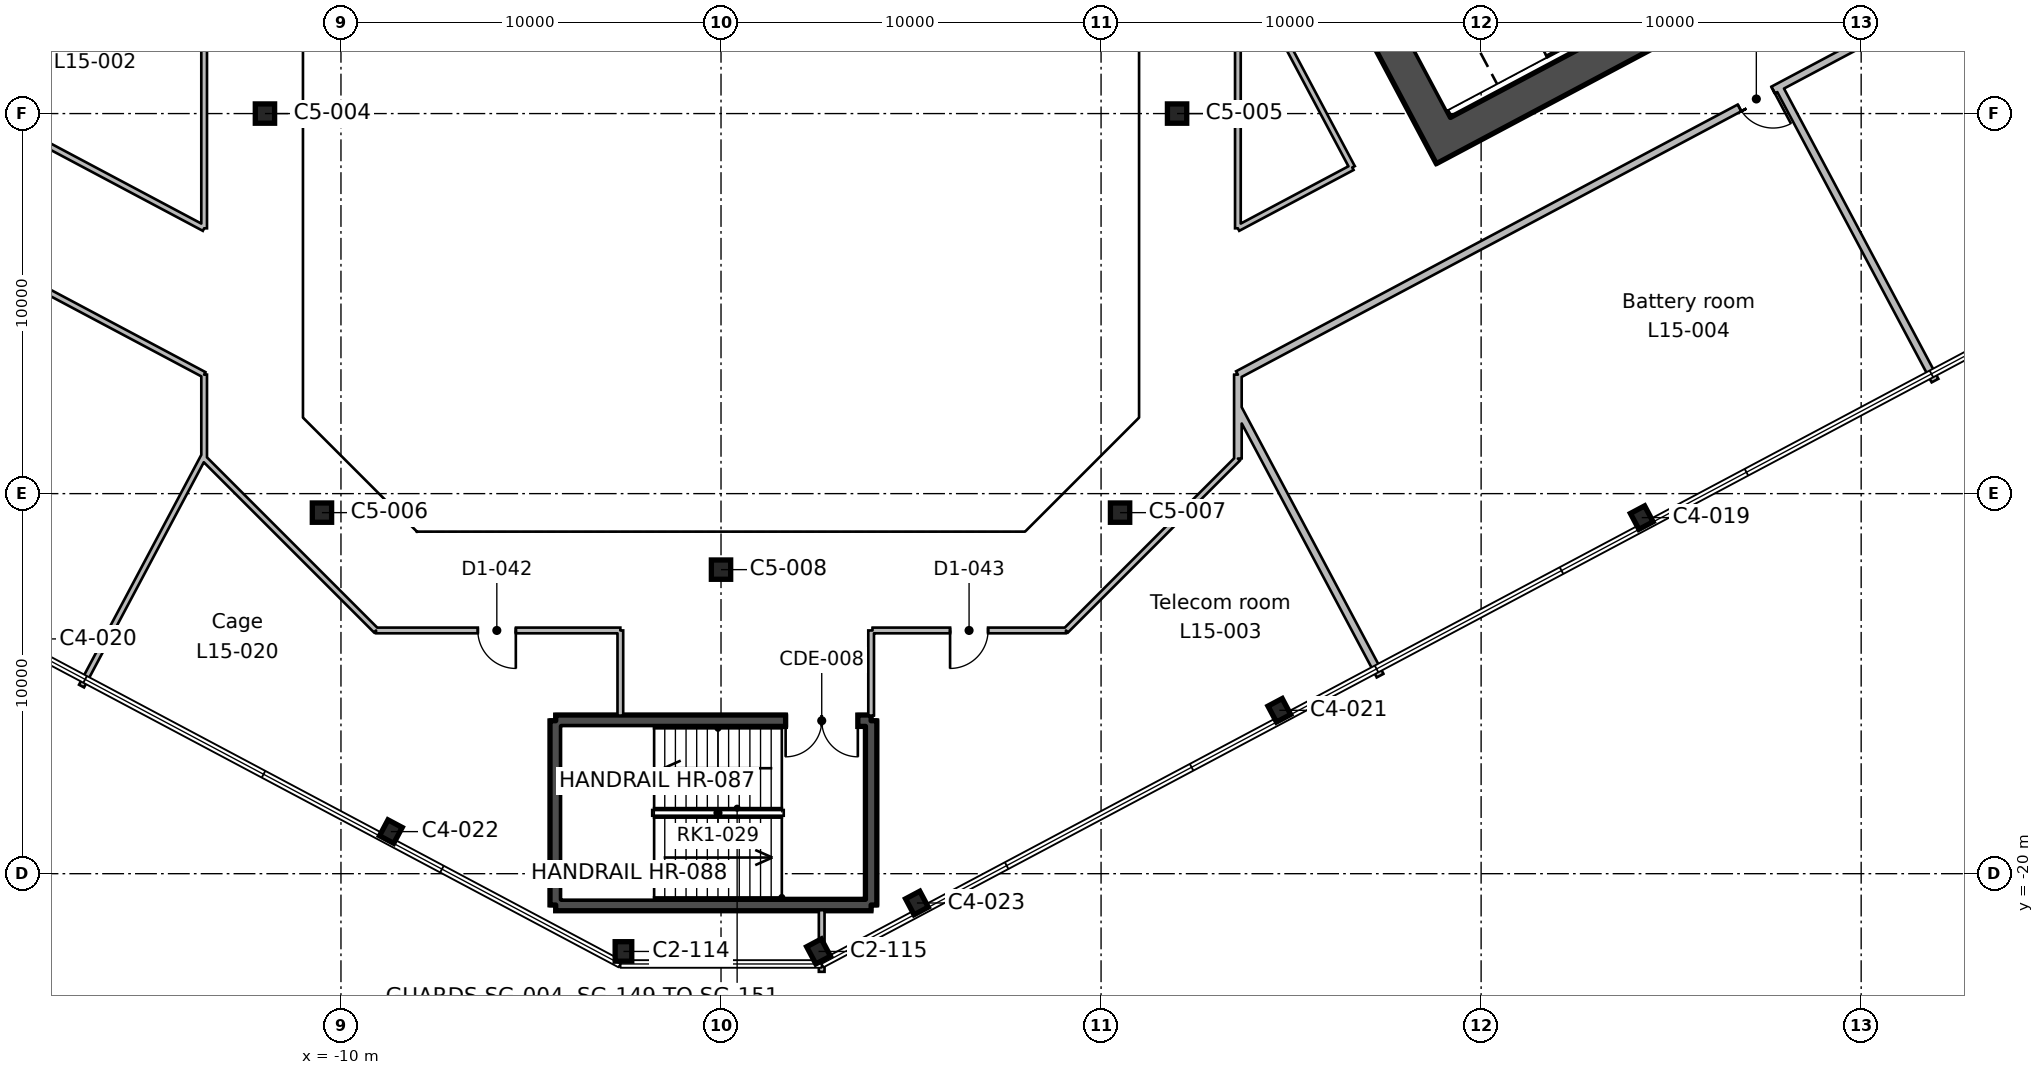
"""IFC4 building model, lengths in metres.
Left out: names, types, materials, properties, quantities, classifications, styles, units other than length and angle.
Written with IfcOpenShell. Run it as: python <this file> out.ifc"""

import sys

from ifc_helpers import new_model, si_unit, direction, frame, frame_2d, origin, origin_2d, place, context, subcontext, project, spatial, rectangle, hollow_rectangle, i_section, extrude, element, fill, save


model = new_model("IFC4")
c1 = context("Model", 3, precision=1e-05, world=origin(), true_north=direction((0.0, 1.0)))
c2 = subcontext(c1, "Body", "Model", "MODEL_VIEW")
j1 = project(units=[si_unit("LENGTHUNIT", "METRE"), si_unit("PLANEANGLEUNIT", "RADIAN")], contexts=[c1])
p1 = place(None, origin())
s1 = spatial("IfcSite", under=j1, at=p1, CompositionType="ELEMENT")
p2 = place(p1, origin())
s2 = spatial("IfcBuilding", under=s1, at=p2, CompositionType="ELEMENT")
p3 = place(p2, frame((0.0, 0.0, 80.0)))
s3 = spatial("IfcBuildingStorey", under=s2, at=p3, CompositionType="ELEMENT", Elevation=80.0)
for number, where, z_axis, x_axis in (
    (1, (-2.567, -22.046, 0.0), (0.0, 0.0, 1.0), (1.0, 0.0, 0.0)),
    (2, (2.567, -22.046, 0.0), (0.0, 0.0, 1.0), (0.883, 0.469, 0.0)),
):
    element("IfcColumn", number, at=place(p3, frame(where, z_axis=z_axis, x_axis=x_axis)), inside=s3, PredefinedType="COLUMN", context=c2, shape_type="SweptSolid", body=[
        extrude(i_section(OverallWidth=0.437, OverallDepth=0.513, WebThickness=0.061, FlangeThickness=0.097, FilletRadius=0.015, at=origin_2d()), origin(), (0.0, 0.0, 1.0), 4.6),
    ])
for number, where, z_axis, x_axis in (
    (3, (5.155, -20.771, 0.0), (0.0, 0.0, 1.0), (0.883, 0.469, 0.0)),
    (4, (-8.687, -18.893, 0.0), (0.0, 0.0, 1.0), (0.883, -0.469, 0.0)),
    (5, (14.691, -15.701, 0.0), (0.0, 0.0, 1.0), (0.883, 0.469, 0.0)),
):
    element("IfcColumn", number, at=place(p3, frame(where, z_axis=z_axis, x_axis=x_axis)), inside=s3, PredefinedType="COLUMN", context=c2, shape_type="SweptSolid", body=[
        extrude(i_section(OverallWidth=0.424, OverallDepth=0.475, WebThickness=0.048, FlangeThickness=0.077, FilletRadius=0.015, at=origin_2d()), origin(), (0.0, 0.0, 1.0), 4.6),
    ])
p4 = place(p3, frame((0.0, -12.0, 0.0), z_axis=(0.0, 0.0, 1.0), x_axis=(1.0, 0.0, 0.0)))
e6 = element("IfcColumn", 6, at=p4, inside=s3, PredefinedType="COLUMN", context=c2, shape_type="SweptSolid", body=[
    extrude(hollow_rectangle(XDim=0.508, YDim=0.508, WallThickness=0.021, InnerFilletRadius=0.01, OuterFilletRadius=0.031, at=origin_2d()), origin(), (0.0, 0.0, 1.0), 4.6),
])
p5 = place(p3, frame((24.227, -10.631, 0.0), z_axis=(0.0, 0.0, 1.0), x_axis=(0.882947592859, 0.469471562786, 0.0)))
e7 = element("IfcColumn", 7, at=p5, inside=s3, PredefinedType="COLUMN", context=c2, shape_type="SweptSolid", body=[
    extrude(i_section(OverallWidth=0.424, OverallDepth=0.475, WebThickness=0.048, FlangeThickness=0.077, FilletRadius=0.015, at=origin_2d()), origin(), (0.0, 0.0, 1.0), 4.6),
])
for number, where, z_axis, x_axis in (
    (8, (-10.5, -10.5, 0.0), (0.0, 0.0, 1.0), (1.0, 0.0, 0.0)),
    (9, (10.5, -10.5, 0.0), (0.0, 0.0, 1.0), (1.0, 0.0, 0.0)),
    (10, (-12.0, 0.0, 0.0), (0.0, 0.0, 1.0), (1.0, 0.0, 0.0)),
    (11, (12.0, 0.0, 0.0), (0.0, 0.0, 1.0), (1.0, 0.0, 0.0)),
):
    element("IfcColumn", number, at=place(p3, frame(where, z_axis=z_axis, x_axis=x_axis)), inside=s3, PredefinedType="COLUMN", context=c2, shape_type="SweptSolid", body=[
        extrude(hollow_rectangle(XDim=0.508, YDim=0.508, WallThickness=0.021, InnerFilletRadius=0.01, OuterFilletRadius=0.031, at=origin_2d()), origin(), (0.0, 0.0, 1.0), 4.6),
    ])
p6 = place(p3, frame((-13.362, 18.43, 0.0), z_axis=(0.0, 0.0, 1.0), x_axis=(-0.46947084998, -0.882947971864, 0.0)))
e12 = element("IfcWall", 12, at=p6, inside=s3, PredefinedType="SHEAR", context=c2, shape_type="SweptSolid", body=[
    extrude(rectangle(XDim=20.0, YDim=0.9, at=frame_2d((10.0, 0.0))), origin(), (0.0, 0.0, 1.0), 4.6),
])
p7 = place(p6, frame((7.0, 0.0, 0.0)))
e13 = element("IfcOpeningElement", 13, at=p7, cuts=e12, PredefinedType="OPENING", context=c2, shape_type="SweptSolid", body=[
    extrude(rectangle(XDim=2.4, YDim=2.4, at=frame_2d((1.2, 1.2))), frame((0.0, 0.46, 0.0), z_axis=(0.0, -1.0, 0.0), x_axis=(1.0, 0.0, 0.0)), (0.0, 0.0, 1.0), 0.92),
])
p8 = place(p3, frame((19.219, -1.107, 0.0), z_axis=(0.0, 0.0, 1.0), x_axis=(-0.46947084998, 0.882947971864, 0.0)))
e14 = element("IfcWall", 14, at=p8, inside=s3, PredefinedType="SHEAR", context=c2, shape_type="SweptSolid", body=[
    extrude(rectangle(XDim=20.0, YDim=0.9, at=frame_2d((10.0, 0.0))), origin(), (0.0, 0.0, 1.0), 4.6),
])
p9 = place(p8, frame((7.0, 0.0, 0.0)))
e15 = element("IfcOpeningElement", 15, at=p9, cuts=e14, PredefinedType="OPENING", context=c2, shape_type="SweptSolid", body=[
    extrude(rectangle(XDim=2.4, YDim=2.4, at=frame_2d((1.2, 1.2))), frame((0.0, 0.46, 0.0), z_axis=(0.0, -1.0, 0.0), x_axis=(1.0, 0.0, 0.0)), (0.0, 0.0, 1.0), 0.92),
])
p10 = place(p3, frame((19.405, -0.498, 0.0), z_axis=(0.0, 0.0, 1.0), x_axis=(0.88294509198, 0.469476266226, 0.0)))
e16 = element("IfcWall", 16, at=p10, inside=s3, PredefinedType="SHEAR", context=c2, shape_type="SweptSolid", body=[
    extrude(rectangle(XDim=20.2, YDim=0.9, at=frame_2d((10.1, 0.0))), origin(), (0.0, 0.0, 1.0), 4.6),
])
p11 = place(p3, frame((3.95, -15.975, 0.0), z_axis=(0.0, 0.0, 1.0), x_axis=(0.0, -1.0, 0.0)))
e17 = element("IfcWall", 17, at=p11, inside=s3, PredefinedType="SHEAR", context=c2, shape_type="SweptSolid", body=[
    extrude(rectangle(XDim=4.85, YDim=0.3, at=frame_2d((2.425, 0.0))), origin(), (0.0, 0.0, 1.0), 4.6),
])
p12 = place(p3, frame((3.95, -20.825, 0.0), z_axis=(0.0, 0.0, 1.0), x_axis=(-1.0, 0.0, 0.0)))
e18 = element("IfcWall", 18, at=p12, inside=s3, PredefinedType="SHEAR", context=c2, shape_type="SweptSolid", body=[
    extrude(rectangle(XDim=8.3, YDim=0.3, at=frame_2d((4.15, 0.0))), origin(), (0.0, 0.0, 1.0), 4.6),
])
p13 = place(p3, frame((-4.35, -20.825, 0.0), z_axis=(0.0, 0.0, 1.0), x_axis=(0.0, 1.0, 0.0)))
e19 = element("IfcWall", 19, at=p13, inside=s3, PredefinedType="SHEAR", context=c2, shape_type="SweptSolid", body=[
    extrude(rectangle(XDim=4.85, YDim=0.3, at=frame_2d((2.425, 0.0))), origin(), (0.0, 0.0, 1.0), 4.6),
])
p14 = place(p3, frame((-4.35, -15.975, 0.0), z_axis=(0.0, 0.0, 1.0), x_axis=(1.0, 0.0, 0.0)))
e20 = element("IfcWall", 20, at=p14, inside=s3, PredefinedType="SHEAR", context=c2, shape_type="SweptSolid", body=[
    extrude(rectangle(XDim=8.3, YDim=0.3, at=frame_2d((4.15, 0.0))), origin(), (0.0, 0.0, 1.0), 4.6),
])
p15 = place(p14, frame((6.05, 0.0, 0.0)))
e21 = element("IfcOpeningElement", 21, at=p15, cuts=e20, PredefinedType="OPENING", context=c2, shape_type="SweptSolid", body=[
    extrude(rectangle(XDim=1.9, YDim=2.1, at=frame_2d((0.95, 1.05))), frame((0.0, 0.16, 0.0), z_axis=(0.0, -1.0, 0.0), x_axis=(1.0, 0.0, 0.0)), (0.0, 0.0, 1.0), 0.32),
])
p16 = place(p3, frame((-2.649, -15.84, 0.0), z_axis=(0.0, 0.0, 1.0), x_axis=(0.0, 1.0, 0.0)))
e22 = element("IfcWall", 22, at=p16, inside=s3, PredefinedType="PARTITIONING", context=c2, shape_type="SweptSolid", body=[
    extrude(rectangle(XDim=2.24, YDim=0.15, at=frame_2d((1.12, 0.0))), origin(), (0.0, 0.0, 1.0), 4.2),
])
p17 = place(p3, frame((-2.649, -13.6, 0.0), z_axis=(0.0, 0.0, 1.0), x_axis=(-1.0, 0.0, 0.0)))
e23 = element("IfcWall", 23, at=p17, inside=s3, PredefinedType="PARTITIONING", context=c2, shape_type="SweptSolid", body=[
    extrude(rectangle(XDim=6.428, YDim=0.15, at=frame_2d((3.214, 0.0))), origin(), (0.0, 0.0, 1.0), 4.2),
])
p18 = place(p17, frame((2.75, 0.0, 0.0)))
e24 = element("IfcOpeningElement", 24, at=p18, cuts=e23, PredefinedType="OPENING", context=c2, shape_type="SweptSolid", body=[
    extrude(rectangle(XDim=1.0, YDim=2.1, at=frame_2d((0.5, 1.05))), frame((0.0, 0.085, 0.0), z_axis=(0.0, -1.0, 0.0), x_axis=(1.0, 0.0, 0.0)), (0.0, 0.0, 1.0), 0.17),
])
p19 = place(p3, frame((-9.077, -13.6, 0.0), z_axis=(0.0, 0.0, 1.0), x_axis=(-0.707106781187, 0.707106781187, 0.0)))
e25 = element("IfcWall", 25, at=p19, inside=s3, PredefinedType="PARTITIONING", context=c2, shape_type="SweptSolid", body=[
    extrude(rectangle(XDim=6.397, YDim=0.15, at=frame_2d((3.198, 0.0))), origin(), (0.0, 0.0, 1.0), 4.2),
])
p20 = place(p3, frame((-13.6, -9.077, 0.0), z_axis=(0.0, 0.0, 1.0), x_axis=(0.0, 1.0, 0.0)))
e26 = element("IfcWall", 26, at=p20, inside=s3, PredefinedType="PARTITIONING", context=c2, shape_type="SweptSolid", body=[
    extrude(rectangle(XDim=2.208, YDim=0.15, at=frame_2d((1.104, 0.0))), origin(), (0.0, 0.0, 1.0), 4.2),
])
p21 = place(p3, frame((-13.6, -6.869, 0.0), z_axis=(0.0, 0.0, 1.0), x_axis=(-0.88295406426, 0.469459391648, 0.0)))
e27 = element("IfcWall", 27, at=p21, inside=s3, PredefinedType="PARTITIONING", context=c2, shape_type="SweptSolid", body=[
    extrude(rectangle(XDim=35.091, YDim=0.15, at=frame_2d((17.545, 0.0))), origin(), (0.0, 0.0, 1.0), 4.2),
])
p22 = place(p21, frame((20.45, 0.0, 0.0)))
e28 = element("IfcOpeningElement", 28, at=p22, cuts=e27, PredefinedType="OPENING", context=c2, shape_type="SweptSolid", body=[
    extrude(rectangle(XDim=1.0, YDim=2.1, at=frame_2d((0.5, 1.05))), frame((0.0, 0.085, 0.0), z_axis=(0.0, -1.0, 0.0), x_axis=(1.0, 0.0, 0.0)), (0.0, 0.0, 1.0), 0.17),
])
p23 = place(p21, frame((17.05, 0.0, 0.0)))
e29 = element("IfcOpeningElement", 29, at=p23, cuts=e27, PredefinedType="OPENING", context=c2, shape_type="SweptSolid", body=[
    extrude(rectangle(XDim=1.0, YDim=2.1, at=frame_2d((0.5, 1.05))), frame((0.0, 0.085, 0.0), z_axis=(0.0, -1.0, 0.0), x_axis=(1.0, 0.0, 0.0)), (0.0, 0.0, 1.0), 0.17),
])
p24 = place(p3, frame((-13.6, -8.998, 0.0), z_axis=(0.0, 0.0, 1.0), x_axis=(-0.469531053644, -0.882915958438, 0.0)))
e30 = element("IfcWall", 30, at=p24, inside=s3, PredefinedType="PARTITIONING", context=c2, shape_type="SweptSolid", body=[
    extrude(rectangle(XDim=6.87, YDim=0.15, at=frame_2d((3.435, 0.0))), origin(), (0.0, 0.0, 1.0), 4.2),
])
p25 = place(p3, frame((-20.142, 0.46, 0.0), z_axis=(0.0, 0.0, 1.0), x_axis=(0.469506937019, 0.882928783136, 0.0)))
e31 = element("IfcWall", 31, at=p25, inside=s3, PredefinedType="PARTITIONING", context=c2, shape_type="SweptSolid", body=[
    extrude(rectangle(XDim=18.1, YDim=0.15, at=frame_2d((9.05, 0.0))), origin(), (0.0, 0.0, 1.0), 4.2),
])
p26 = place(p25, frame((8.55, 0.0, 0.0)))
e32 = element("IfcOpeningElement", 32, at=p26, cuts=e31, PredefinedType="OPENING", context=c2, shape_type="SweptSolid", body=[
    extrude(rectangle(XDim=1.0, YDim=2.1, at=frame_2d((0.5, 1.05))), frame((0.0, 0.085, 0.0), z_axis=(0.0, -1.0, 0.0), x_axis=(1.0, 0.0, 0.0)), (0.0, 0.0, 1.0), 0.17),
])
p27 = place(p3, frame((-13.6, -3.019, 0.0), z_axis=(0.0, 0.0, 1.0), x_axis=(-0.882915984826, 0.469531004022, 0.0)))
e33 = element("IfcWall", 33, at=p27, inside=s3, PredefinedType="PARTITIONING", context=c2, shape_type="SweptSolid", body=[
    extrude(rectangle(XDim=7.409, YDim=0.15, at=frame_2d((3.705, 0.0))), origin(), (0.0, 0.0, 1.0), 4.2),
])
p28 = place(p3, frame((-13.6, 9.077, 0.0), z_axis=(0.0, 0.0, 1.0), x_axis=(0.0, -1.0, 0.0)))
e34 = element("IfcWall", 34, at=p28, inside=s3, PredefinedType="PARTITIONING", context=c2, shape_type="SweptSolid", body=[
    extrude(rectangle(XDim=12.096, YDim=0.15, at=frame_2d((6.048, 0.0))), origin(), (0.0, 0.0, 1.0), 4.2),
])
p29 = place(p3, frame((2.649, -22.582, 0.0), z_axis=(0.0, 0.0, 1.0), x_axis=(0.0, 1.0, 0.0)))
e35 = element("IfcWall", 35, at=p29, inside=s3, PredefinedType="PARTITIONING", context=c2, shape_type="SweptSolid", body=[
    extrude(rectangle(XDim=1.622, YDim=0.15, at=frame_2d((0.811, 0.0))), origin(), (0.0, 0.0, 1.0), 4.2),
])
p30 = place(p3, frame((3.95, -13.6, 0.0), z_axis=(0.0, 0.0, 1.0), x_axis=(0.0, -1.0, 0.0)))
e36 = element("IfcWall", 36, at=p30, inside=s3, PredefinedType="PARTITIONING", context=c2, shape_type="SweptSolid", body=[
    extrude(rectangle(XDim=2.24, YDim=0.15, at=frame_2d((1.12, 0.0))), origin(), (0.0, 0.0, 1.0), 4.2),
])
p31 = place(p3, frame((13.6, -7.756, 0.0), z_axis=(0.0, 0.0, 1.0), x_axis=(0.0, -1.0, 0.0)))
e37 = element("IfcWall", 37, at=p31, inside=s3, PredefinedType="PARTITIONING", context=c2, shape_type="SweptSolid", body=[
    extrude(rectangle(XDim=1.321, YDim=0.2, at=frame_2d((0.66, 0.0))), origin(), (0.0, 0.0, 1.0), 4.2),
])
p32 = place(p3, frame((13.6, -9.077, 0.0), z_axis=(0.0, 0.0, 1.0), x_axis=(-0.707106781187, -0.707106781187, 0.0)))
e38 = element("IfcWall", 38, at=p32, inside=s3, PredefinedType="PARTITIONING", context=c2, shape_type="SweptSolid", body=[
    extrude(rectangle(XDim=6.397, YDim=0.15, at=frame_2d((3.198, 0.0))), origin(), (0.0, 0.0, 1.0), 4.2),
])
p33 = place(p3, frame((9.077, -13.6, 0.0), z_axis=(0.0, 0.0, 1.0), x_axis=(-1.0, 0.0, 0.0)))
e39 = element("IfcWall", 39, at=p33, inside=s3, PredefinedType="PARTITIONING", context=c2, shape_type="SweptSolid", body=[
    extrude(rectangle(XDim=5.092, YDim=0.15, at=frame_2d((2.546, 0.0))), origin(), (0.0, 0.0, 1.0), 4.2),
])
p34 = place(p33, frame((2.05, 0.0, 0.0)))
e40 = element("IfcOpeningElement", 40, at=p34, cuts=e39, PredefinedType="OPENING", context=c2, shape_type="SweptSolid", body=[
    extrude(rectangle(XDim=1.0, YDim=2.1, at=frame_2d((0.5, 1.05))), frame((0.0, 0.085, 0.0), z_axis=(0.0, -1.0, 0.0), x_axis=(1.0, 0.0, 0.0)), (0.0, 0.0, 1.0), 0.17),
])
p35 = place(p3, frame((13.6, -7.75, 0.0), z_axis=(0.0, 0.0, 1.0), x_axis=(0.469489555723, -0.882938025609, 0.0)))
e41 = element("IfcWall", 41, at=p35, inside=s3, PredefinedType="PARTITIONING", context=c2, shape_type="SweptSolid", body=[
    extrude(rectangle(XDim=7.972, YDim=0.2, at=frame_2d((3.986, 0.0))), origin(), (0.0, 0.0, 1.0), 4.2),
])
p36 = place(p3, frame((13.6, -6.869, 0.0), z_axis=(0.0, 0.0, 1.0), x_axis=(0.0, -1.0, 0.0)))
e42 = element("IfcWall", 42, at=p36, inside=s3, PredefinedType="PARTITIONING", context=c2, shape_type="SweptSolid", body=[
    extrude(rectangle(XDim=0.887, YDim=0.2, at=frame_2d((0.444, 0.0))), origin(), (0.0, 0.0, 1.0), 4.2),
])
p37 = place(p3, frame((27.835, 0.699, 0.0), z_axis=(0.0, 0.0, 1.0), x_axis=(0.469540779382, -0.882910786262, 0.0)))
e43 = element("IfcWall", 43, at=p37, inside=s3, PredefinedType="PARTITIONING", context=c2, shape_type="SweptSolid", body=[
    extrude(rectangle(XDim=8.749, YDim=0.2, at=frame_2d((4.375, 0.0))), origin(), (0.0, 0.0, 1.0), 4.2),
])
p38 = place(p3, frame((57.041, 16.229, 0.0), z_axis=(0.0, 0.0, 1.0), x_axis=(-0.882947975476, -0.469470843188, 0.0)))
e44 = element("IfcWall", 44, at=p38, inside=s3, PredefinedType="PARTITIONING", context=c2, shape_type="SweptSolid", body=[
    extrude(rectangle(XDim=49.2, YDim=0.2, at=frame_2d((24.6, 0.0))), origin(), (0.0, 0.0, 1.0), 4.2),
])
p39 = place(p38, frame((33.25, 0.0, 0.0)))
e45 = element("IfcOpeningElement", 45, at=p39, cuts=e44, PredefinedType="OPENING", context=c2, shape_type="SweptSolid", body=[
    extrude(rectangle(XDim=1.0, YDim=2.1, at=frame_2d((0.5, 1.05))), frame((0.0, 0.11, 0.0), z_axis=(0.0, -1.0, 0.0), x_axis=(1.0, 0.0, 0.0)), (0.0, 0.0, 1.0), 0.22),
])
p40 = place(p38, frame((24.05, 0.0, 0.0)))
e46 = element("IfcOpeningElement", 46, at=p40, cuts=e44, PredefinedType="OPENING", context=c2, shape_type="SweptSolid", body=[
    extrude(rectangle(XDim=1.0, YDim=2.1, at=frame_2d((0.5, 1.05))), frame((0.0, 0.11, 0.0), z_axis=(0.0, -1.0, 0.0), x_axis=(1.0, 0.0, 0.0)), (0.0, 0.0, 1.0), 0.22),
])
p41 = place(p38, frame((20.95, 0.0, 0.0)))
e47 = element("IfcOpeningElement", 47, at=p41, cuts=e44, PredefinedType="OPENING", context=c2, shape_type="SweptSolid", body=[
    extrude(rectangle(XDim=1.0, YDim=2.1, at=frame_2d((0.5, 1.05))), frame((0.0, 0.11, 0.0), z_axis=(0.0, -1.0, 0.0), x_axis=(1.0, 0.0, 0.0)), (0.0, 0.0, 1.0), 0.22),
])
p42 = place(p3, frame((13.6, 4.243, 0.0), z_axis=(0.0, 0.0, 1.0), x_axis=(0.0, -1.0, 0.0)))
e48 = element("IfcWall", 48, at=p42, inside=s3, PredefinedType="PARTITIONING", context=c2, shape_type="SweptSolid", body=[
    extrude(rectangle(XDim=7.262, YDim=0.15, at=frame_2d((3.631, 0.0))), origin(), (0.0, 0.0, 1.0), 4.2),
])
p43 = place(p3, frame((13.6, -3.019, 0.0), z_axis=(0.0, 0.0, 1.0), x_axis=(0.8828717575, 0.469614160571, 0.0)))
e49 = element("IfcWall", 49, at=p43, inside=s3, PredefinedType="PARTITIONING", context=c2, shape_type="SweptSolid", body=[
    extrude(rectangle(XDim=3.409, YDim=0.15, at=frame_2d((1.705, 0.0))), origin(), (0.0, 0.0, 1.0), 4.2),
])
p44 = place(p3, frame((16.61, -1.418, 0.0), z_axis=(0.0, 0.0, 1.0), x_axis=(-0.469479085554, 0.882943592891, 0.0)))
e50 = element("IfcWall", 50, at=p44, inside=s3, PredefinedType="PARTITIONING", context=c2, shape_type="SweptSolid", body=[
    extrude(rectangle(XDim=6.411, YDim=0.15, at=frame_2d((3.206, 0.0))), origin(), (0.0, 0.0, 1.0), 4.2),
])
p45 = place(p15, frame((1.9, 0.0, 0.0), z_axis=(0.0, 0.0, 1.0), x_axis=(-1.0, 0.0, 0.0)))
e51 = element("IfcDoor", 51, at=p45, inside=s3, OperationType="DOUBLE_DOOR_SINGLE_SWING", PredefinedType="DOOR", context=c2, shape_type="SweptSolid", body=[
    extrude(rectangle(XDim=1.9, YDim=2.1, at=frame_2d((0.95, 1.05))), frame((0.0, 0.025, 0.0), z_axis=(0.0, -1.0, 0.0), x_axis=(1.0, 0.0, 0.0)), (0.0, 0.0, 1.0), 0.05),
])
fill(e21, e51)
p46 = place(p34, origin())
e52 = element("IfcDoor", 52, at=p46, inside=s3, OperationType="SINGLE_SWING_RIGHT", PredefinedType="DOOR", context=c2, shape_type="SweptSolid", body=[
    extrude(rectangle(XDim=1.0, YDim=2.1, at=frame_2d((0.5, 1.05))), frame((0.0, 0.025, 0.0), z_axis=(0.0, -1.0, 0.0), x_axis=(1.0, 0.0, 0.0)), (0.0, 0.0, 1.0), 0.05),
])
fill(e40, e52)
p47 = place(p39, origin())
e53 = element("IfcDoor", 53, at=p47, inside=s3, OperationType="SINGLE_SWING_LEFT", PredefinedType="DOOR", context=c2, shape_type="SweptSolid", body=[
    extrude(rectangle(XDim=1.0, YDim=2.1, at=frame_2d((0.5, 1.05))), frame((0.0, 0.025, 0.0), z_axis=(0.0, -1.0, 0.0), x_axis=(1.0, 0.0, 0.0)), (0.0, 0.0, 1.0), 0.05),
])
fill(e45, e53)
p48 = place(p18, origin())
e54 = element("IfcDoor", 54, at=p48, inside=s3, OperationType="SINGLE_SWING_LEFT", PredefinedType="DOOR", context=c2, shape_type="SweptSolid", body=[
    extrude(rectangle(XDim=1.0, YDim=2.1, at=frame_2d((0.5, 1.05))), frame((0.0, 0.025, 0.0), z_axis=(0.0, -1.0, 0.0), x_axis=(1.0, 0.0, 0.0)), (0.0, 0.0, 1.0), 0.05),
])
fill(e24, e54)
save(model, sys.argv[1])
